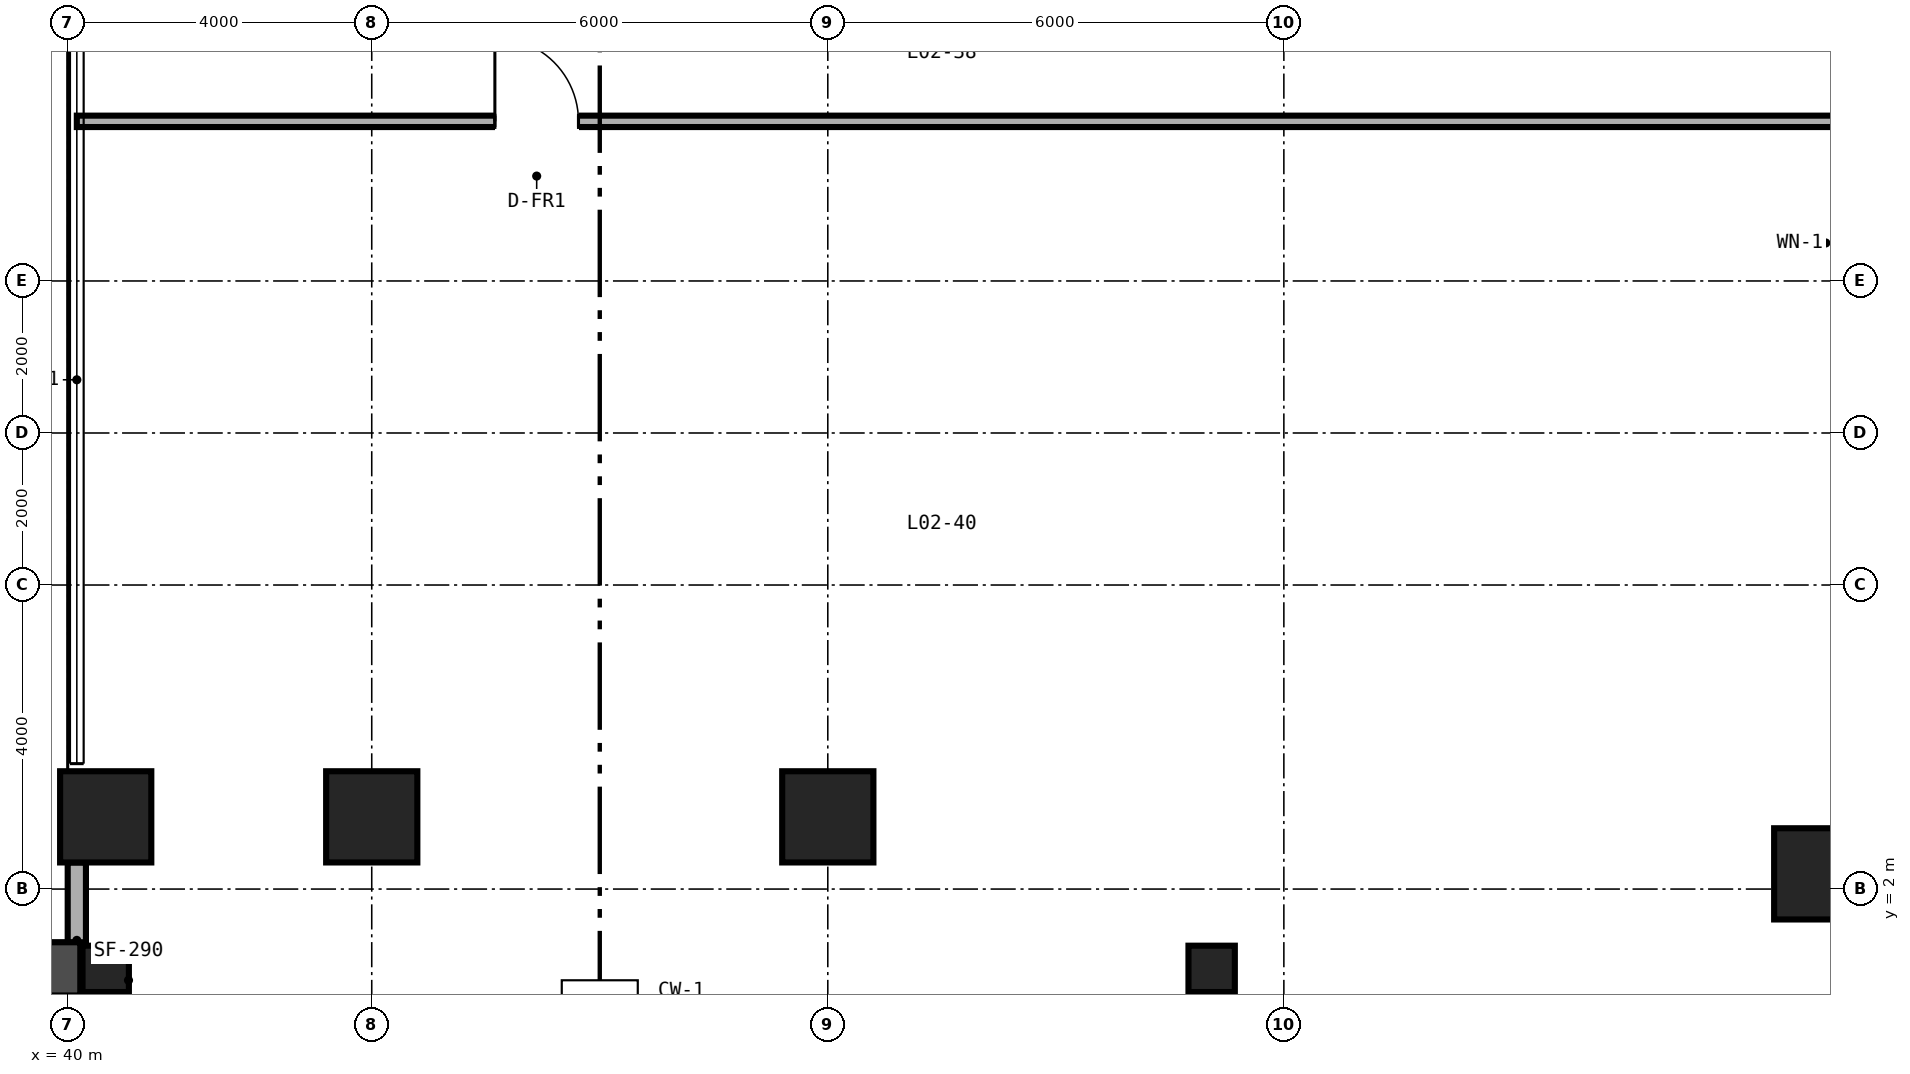
"""IFC4 building model, lengths in metres.
Left out: names, types, materials, properties, quantities, classifications, styles, units other than length and angle.
Written with IfcOpenShell. Run it as: python <this file> out.ifc"""

import sys

from ifc_helpers import new_model, si_unit, direction, frame, frame_2d, origin, origin_2d, place, context, subcontext, project, spatial, rectangle, hollow_circle, extrude, source, transform, mapped, element, fill, save


model = new_model("IFC4")
c1 = context("Model", 3, precision=1e-05, world=origin(), true_north=direction((0.0, 1.0)))
c2 = subcontext(c1, "Body", "Model", "MODEL_VIEW")
j1 = project(units=[si_unit("LENGTHUNIT", "METRE"), si_unit("PLANEANGLEUNIT", "RADIAN")], contexts=[c1])
p1 = place(None, origin())
s1 = spatial("IfcSite", under=j1, at=p1, CompositionType="ELEMENT")
p2 = place(p1, origin())
s2 = spatial("IfcBuilding", under=s1, at=p2, CompositionType="ELEMENT")
p3 = place(p2, frame((0.0, 0.0, 6.0)))
s3 = spatial("IfcBuildingStorey", under=s2, at=p3, CompositionType="ELEMENT", Elevation=6.0)
m1 = source(origin(), c2, "Body", "SweptSolid", [
    extrude(rectangle(XDim=1.2, YDim=1.2, at=origin_2d()), origin(), (0.0, 0.0, 1.0), 5.08),
])
p4 = place(p3, frame((63.05, 2.2, 0.0), z_axis=(0.0, 0.0, 1.0), x_axis=(1.0, 0.0, 0.0)))
e1 = element("IfcColumn", 1, at=p4, inside=s3, PredefinedType="COLUMN", context=c2, shape_type="MappedRepresentation", body=[
    mapped(m1, transform((0.0, 0.0, 0.0), scale=1.0)),
])
m2 = source(origin(), c2, "Body", "SweptSolid", [
    extrude(hollow_circle(Radius=0.305, WallThickness=0.025, at=origin_2d()), origin(), (0.0, 0.0, 1.0), 5.08),
])
for number, where, z_axis, x_axis in (
    (2, (40.5, 0.95, 0.0), (0.0, 0.0, 1.0), (1.0, 0.0, 0.0)),
    (3, (55.05, 0.95, 0.0), (0.0, 0.0, 1.0), (1.0, 0.0, 0.0)),
):
    element("IfcColumn", number, at=place(p3, frame(where, z_axis=z_axis, x_axis=x_axis)), inside=s3, PredefinedType="COLUMN", context=c2, shape_type="MappedRepresentation", body=[
        mapped(m2, transform((0.0, 0.0, 0.0), scale=1.0)),
    ])
for number, where, z_axis, x_axis in (
    (4, (40.5, 2.95, 0.0), (0.0, 0.0, 1.0), (1.0, 0.0, 0.0)),
    (5, (44.0, 2.95, 0.0), (0.0, 0.0, 1.0), (1.0, 0.0, 0.0)),
    (6, (50.0, 2.95, 0.0), (0.0, 0.0, 1.0), (1.0, 0.0, 0.0)),
):
    element("IfcColumn", number, at=place(p3, frame(where, z_axis=z_axis, x_axis=x_axis)), inside=s3, PredefinedType="COLUMN", context=c2, shape_type="MappedRepresentation", body=[
        mapped(m1, transform((0.0, 0.0, 0.0), scale=1.0)),
    ])
p5 = place(p3, frame((40.12, 0.3, 0.0), z_axis=(0.0, 0.0, 1.0), x_axis=(0.0, 1.0, 0.0)))
e7 = element("IfcWall", 7, at=p5, inside=s3, PredefinedType="SOLIDWALL", context=c2, shape_type="SweptSolid", body=[
    extrude(rectangle(XDim=2.05, YDim=0.24, at=frame_2d((1.025, 0.0))), origin(), (0.0, 0.0, 1.0), 4.153),
])
p6 = place(p3, frame((40.12, 12.1, 0.0), z_axis=(0.0, 0.0, 1.0), x_axis=(1.0, 0.0, 0.0)))
e8 = element("IfcWall", 8, at=p6, inside=s3, PredefinedType="PARTITIONING", context=c2, shape_type="SweptSolid", body=[
    extrude(rectangle(XDim=23.68, YDim=0.15, at=frame_2d((11.84, 0.0))), origin(), (0.0, 0.0, 1.0), 4.301),
])
p7 = place(p6, frame((5.5, 0.0, 0.0)))
e9 = element("IfcOpeningElement", 9, at=p7, cuts=e8, PredefinedType="OPENING", context=c2, shape_type="SweptSolid", body=[
    extrude(rectangle(XDim=1.1, YDim=2.15, at=frame_2d((0.55, 1.075))), frame((0.0, 0.085, 0.0), z_axis=(0.0, -1.0, 0.0), x_axis=(1.0, 0.0, 0.0)), (0.0, 0.0, 1.0), 0.17),
])
m3 = source(origin(), c2, "Body", "SweptSolid", [
    extrude(rectangle(XDim=1.1, YDim=2.15, at=frame_2d((0.55, 1.075))), frame((0.0, 0.025, 0.0), z_axis=(0.0, -1.0, 0.0), x_axis=(1.0, 0.0, 0.0)), (0.0, 0.0, 1.0), 0.05),
])
p8 = place(p7, origin())
e10 = element("IfcDoor", 10, at=p8, inside=s3, OperationType="SINGLE_SWING_LEFT", PredefinedType="DOOR", context=c2, shape_type="MappedRepresentation", body=[
    mapped(m3, transform((0.0, 0.0, 0.0), scale=1.0)),
])
fill(e9, e10)
save(model, sys.argv[1])
